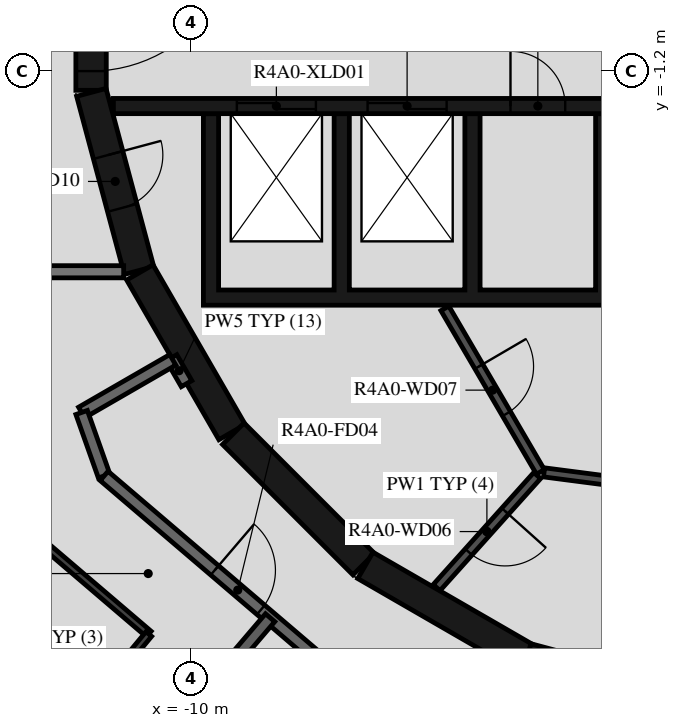
"""IFC4 building model, lengths in metres.
Left out: names, types, materials, properties, quantities, classifications, styles, units other than length and angle.
Written with IfcOpenShell. Run it as: python <this file> out.ifc"""

import sys

from ifc_helpers import new_model, si_unit, direction, frame, frame_2d, origin, place, context, subcontext, project, spatial, polyline, rectangle, outline, extrude, element, fill, save


model = new_model("IFC4")
c1 = context("Model", 3, precision=1e-05, world=origin(), true_north=direction((0.0, 1.0)))
c2 = subcontext(c1, "Body", "Model", "MODEL_VIEW")
j1 = project(units=[si_unit("LENGTHUNIT", "METRE"), si_unit("PLANEANGLEUNIT", "RADIAN")], contexts=[c1])
p1 = place(None, origin())
s1 = spatial("IfcSite", under=j1, at=p1, CompositionType="ELEMENT")
p2 = place(p1, origin())
s2 = spatial("IfcBuilding", under=s1, at=p2, CompositionType="ELEMENT")
p3 = place(p2, frame((0.0, 0.0, 151.7)))
s3 = spatial("IfcBuildingStorey", under=s2, at=p3, CompositionType="ELEMENT", Elevation=151.7)
p4 = place(p3, frame((-11.647, 1.516, 0.0), z_axis=(0.0, 0.0, 1.0), x_axis=(0.0, -1.0, 0.0)))
e1 = element("IfcWall", 1, at=p4, inside=s3, PredefinedType="SHEAR", context=c2, shape_type="SweptSolid", body=[
    extrude(rectangle(XDim=3.033, YDim=0.5, at=frame_2d((1.516, 0.0))), origin(), (0.0, 0.0, 1.0), 3.12),
])
p5 = place(p4, frame((0.316, 0.0, 0.0)))
e2 = element("IfcOpeningElement", 2, at=p5, cuts=e1, PredefinedType="OPENING", context=c2, shape_type="SweptSolid", body=[
    extrude(rectangle(XDim=2.4, YDim=2.1, at=frame_2d((1.2, 1.05))), frame((0.0, 0.26, 0.0), z_axis=(0.0, -1.0, 0.0), x_axis=(1.0, 0.0, 0.0)), (0.0, 0.0, 1.0), 0.52),
])
p6 = place(p3, frame((-11.643, -1.55, 0.0), z_axis=(0.0, 0.0, 1.0), x_axis=(0.258734743916, -0.965948410781, 0.0)))
e3 = element("IfcWall", 3, at=p6, inside=s3, PredefinedType="SHEAR", context=c2, shape_type="SweptSolid", body=[
    extrude(rectangle(XDim=3.033, YDim=0.5, at=frame_2d((1.516, 0.0))), origin(), (0.0, 0.0, 1.0), 3.12),
])
p7 = place(p6, frame((1.066, 0.0, 0.0)))
e4 = element("IfcOpeningElement", 4, at=p7, cuts=e3, PredefinedType="OPENING", context=c2, shape_type="SweptSolid", body=[
    extrude(rectangle(XDim=0.9, YDim=2.1, at=frame_2d((0.45, 1.05))), frame((0.0, 0.26, 0.0), z_axis=(0.0, -1.0, 0.0), x_axis=(1.0, 0.0, 0.0)), (0.0, 0.0, 1.0), 0.52),
])
p8 = place(p3, frame((-10.845, -4.51, 0.0), z_axis=(0.0, 0.0, 1.0), x_axis=(0.500087131594, -0.865975092491, 0.0)))
e5 = element("IfcWall", 5, at=p8, inside=s3, PredefinedType="SHEAR", context=c2, shape_type="SweptSolid", body=[
    extrude(rectangle(XDim=3.033, YDim=0.5, at=frame_2d((1.516, 0.0))), origin(), (0.0, 0.0, 1.0), 3.12),
])
p9 = place(p3, frame((-9.308, -7.164, 0.0), z_axis=(0.0, 0.0, 1.0), x_axis=(0.707106781187, -0.707106781187, 0.0)))
e6 = element("IfcWall", 6, at=p9, inside=s3, PredefinedType="SHEAR", context=c2, shape_type="SweptSolid", body=[
    extrude(rectangle(XDim=3.032, YDim=0.5, at=frame_2d((1.516, 0.0))), origin(), (0.0, 0.0, 1.0), 3.12),
])
for number, where, z_axis, x_axis in (
    (7, (-7.137, -9.329, 0.0), (0.0, 0.0, 1.0), (0.866, -0.5, 0.0)),
    (8, (-4.479, -10.858, 0.0), (0.0, 0.0, 1.0), (0.966, -0.259, 0.0)),
):
    element("IfcWall", number, at=place(p3, frame(where, z_axis=z_axis, x_axis=x_axis)), inside=s3, PredefinedType="SHEAR", context=c2, shape_type="SweptSolid", body=[
        extrude(rectangle(XDim=3.033, YDim=0.5, at=frame_2d((1.516, 0.0))), origin(), (0.0, 0.0, 1.0), 3.12),
    ])
p10 = place(p3, origin())
e9 = element("IfcWall", 9, at=p10, inside=s3, PredefinedType="SHEAR", context=c2, shape_type="SweptSolid", body=[
    extrude(outline(polyline([(9.8, -5.05), (9.8, -4.8), (9.8, -1.9), (9.55, -1.9), (9.55, -4.8), (7.65, -4.8), (7.65, -1.9), (7.4, -1.9), (7.4, -4.8), (5.5, -4.8), (5.5, -1.9), (5.25, -1.9), (5.25, -4.8), (3.35, -4.8), (3.35, -1.9), (3.1, -1.9), (3.1, -4.8), (1.2, -4.8), (1.2, -1.9), (0.95, -1.9), (0.95, -4.8), (-0.95, -4.8), (-0.95, -1.9), (-1.2, -1.9), (-1.2, -4.8), (-3.1, -4.8), (-3.1, -1.9), (-3.35, -1.9), (-3.35, -4.8), (-5.25, -4.8), (-5.25, -1.9), (-5.5, -1.9), (-5.5, -4.8), (-7.4, -4.8), (-7.4, -1.9), (-7.65, -1.9), (-7.65, -4.8), (-9.55, -4.8), (-9.55, -1.9), (-9.8, -1.9), (-9.8, -4.8), (-9.8, -5.05), (9.8, -5.05)])), origin(), (0.0, 0.0, 1.0), 3.12),
])
p11 = place(p3, frame((-11.28, -1.775, 0.0), z_axis=(0.0, 0.0, 1.0), x_axis=(1.0, 0.0, 0.0)))
e10 = element("IfcWall", 10, at=p11, inside=s3, PredefinedType="SHEAR", context=c2, shape_type="SweptSolid", body=[
    extrude(rectangle(XDim=14.38, YDim=0.25, at=frame_2d((7.19, 0.0))), origin(), (0.0, 0.0, 1.0), 3.12),
])
p12 = place(p11, frame((2.03, 0.0, 0.0)))
e11 = element("IfcOpeningElement", 11, at=p12, cuts=e10, PredefinedType="OPENING", context=c2, shape_type="SweptSolid", body=[
    extrude(rectangle(XDim=1.3, YDim=2.1, at=frame_2d((0.65, 1.05))), frame((0.0, 0.135, 0.0), z_axis=(0.0, -1.0, 0.0), x_axis=(1.0, 0.0, 0.0)), (0.0, 0.0, 1.0), 0.27),
])
p13 = place(p11, frame((4.18, 0.0, 0.0)))
e12 = element("IfcOpeningElement", 12, at=p13, cuts=e10, PredefinedType="OPENING", context=c2, shape_type="SweptSolid", body=[
    extrude(rectangle(XDim=1.3, YDim=2.1, at=frame_2d((0.65, 1.05))), frame((0.0, 0.135, 0.0), z_axis=(0.0, -1.0, 0.0), x_axis=(1.0, 0.0, 0.0)), (0.0, 0.0, 1.0), 0.27),
])
p14 = place(p11, frame((12.88, 0.0, 0.0)))
e13 = element("IfcOpeningElement", 13, at=p14, cuts=e10, PredefinedType="OPENING", context=c2, shape_type="SweptSolid", body=[
    extrude(rectangle(XDim=1.1, YDim=2.1, at=frame_2d((0.55, 1.05))), frame((0.0, 0.135, 0.0), z_axis=(0.0, -1.0, 0.0), x_axis=(1.0, 0.0, 0.0)), (0.0, 0.0, 1.0), 0.27),
])
p15 = place(p11, frame((6.53, 0.0, 0.0)))
e14 = element("IfcOpeningElement", 14, at=p15, cuts=e10, PredefinedType="OPENING", context=c2, shape_type="SweptSolid", body=[
    extrude(rectangle(XDim=0.9, YDim=2.1, at=frame_2d((0.45, 1.05))), frame((0.0, 0.135, 0.0), z_axis=(0.0, -1.0, 0.0), x_axis=(1.0, 0.0, 0.0)), (0.0, 0.0, 1.0), 0.27),
])
p16 = place(p11, frame((8.68, 0.0, 0.0)))
e15 = element("IfcOpeningElement", 15, at=p16, cuts=e10, PredefinedType="OPENING", context=c2, shape_type="SweptSolid", body=[
    extrude(rectangle(XDim=0.9, YDim=2.1, at=frame_2d((0.45, 1.05))), frame((0.0, 0.135, 0.0), z_axis=(0.0, -1.0, 0.0), x_axis=(1.0, 0.0, 0.0)), (0.0, 0.0, 1.0), 0.27),
])
p17 = place(p11, frame((10.83, 0.0, 0.0)))
e16 = element("IfcOpeningElement", 16, at=p17, cuts=e10, PredefinedType="OPENING", context=c2, shape_type="SweptSolid", body=[
    extrude(rectangle(XDim=0.9, YDim=2.1, at=frame_2d((0.45, 1.05))), frame((0.0, 0.135, 0.0), z_axis=(0.0, -1.0, 0.0), x_axis=(1.0, 0.0, 0.0)), (0.0, 0.0, 1.0), 0.27),
])
p18 = place(p3, frame((-5.829, -5.102, 0.0), z_axis=(0.0, 0.0, 1.0), x_axis=(0.504480008384, -0.863423373057, 0.0)))
e17 = element("IfcWall", 17, at=p18, inside=s3, PredefinedType="PARTITIONING", context=c2, shape_type="SweptSolid", body=[
    extrude(rectangle(XDim=3.115, YDim=0.15, at=frame_2d((1.558, 0.0))), origin(), (0.0, 0.0, 1.0), 3.12),
])
p19 = place(p18, frame((1.107, 0.0, 0.0)))
e18 = element("IfcOpeningElement", 18, at=p19, cuts=e17, PredefinedType="OPENING", context=c2, shape_type="SweptSolid", body=[
    extrude(rectangle(XDim=0.9, YDim=2.1, at=frame_2d((0.45, 1.05))), frame((0.0, 0.085, 0.0), z_axis=(0.0, -1.0, 0.0), x_axis=(1.0, 0.0, 0.0)), (0.0, 0.0, 1.0), 0.17),
])
p20 = place(p3, frame((-4.311, -7.851, 0.0), z_axis=(0.0, 0.0, 1.0), x_axis=(-0.667869133096, -0.744278725383, 0.0)))
e19 = element("IfcWall", 19, at=p20, inside=s3, PredefinedType="PARTITIONING", context=c2, shape_type="SweptSolid", body=[
    extrude(rectangle(XDim=2.476, YDim=0.15, at=frame_2d((1.238, 0.0))), origin(), (0.0, 0.0, 1.0), 3.12),
])
p21 = place(p20, frame((0.788, 0.0, 0.0)))
e20 = element("IfcOpeningElement", 20, at=p21, cuts=e19, PredefinedType="OPENING", context=c2, shape_type="SweptSolid", body=[
    extrude(rectangle(XDim=0.9, YDim=2.1, at=frame_2d((0.45, 1.05))), frame((0.0, 0.085, 0.0), z_axis=(0.0, -1.0, 0.0), x_axis=(1.0, 0.0, 0.0)), (0.0, 0.0, 1.0), 0.17),
])
p22 = place(p3, frame((-4.198, -7.799, 0.0), z_axis=(0.0, 0.0, 1.0), x_axis=(0.991686747293, -0.128675542523, 0.0)))
e21 = element("IfcWall", 21, at=p22, inside=s3, PredefinedType="PARTITIONING", context=c2, shape_type="SweptSolid", body=[
    extrude(rectangle(XDim=1.793, YDim=0.15, at=frame_2d((0.896, 0.0))), origin(), (0.0, 0.0, 1.0), 3.12),
])
p23 = place(p3, frame((-10.323, -5.914, 0.0), z_axis=(0.0, 0.0, 1.0), x_axis=(0.500137201729, -0.865946175837, 0.0)))
e22 = element("IfcWall", 22, at=p23, inside=s3, PredefinedType="STANDARD", context=c2, shape_type="SweptSolid", body=[
    extrude(rectangle(XDim=0.492, YDim=0.2, at=frame_2d((0.246, 0.0))), origin(), (0.0, 0.0, 1.0), 3.12),
])
p24 = place(p3, frame((-10.303, -5.949, 0.0), z_axis=(0.0, 0.0, 1.0), x_axis=(-0.866021168401, -0.500007335828, 0.0)))
e23 = element("IfcWall", 23, at=p24, inside=s3, PredefinedType="STANDARD", context=c2, shape_type="SweptSolid", body=[
    extrude(rectangle(XDim=1.731, YDim=0.2, at=frame_2d((0.865, 0.0))), origin(), (0.0, 0.0, 1.0), 3.12),
])
p25 = place(p3, frame((-11.802, -6.814, 0.0), z_axis=(0.0, 0.0, 1.0), x_axis=(0.333904297771, -0.942606980629, 0.0)))
e24 = element("IfcWall", 24, at=p25, inside=s3, PredefinedType="STANDARD", context=c2, shape_type="SweptSolid", body=[
    extrude(rectangle(XDim=1.107, YDim=0.2, at=frame_2d((0.553, 0.0))), origin(), (0.0, 0.0, 1.0), 3.12),
])
p26 = place(p3, frame((-11.433, -7.858, 0.0), z_axis=(0.0, 0.0, 1.0), x_axis=(0.760412154545, -0.649440801937, 0.0)))
e25 = element("IfcWall", 25, at=p26, inside=s3, PredefinedType="STANDARD", context=c2, shape_type="SweptSolid", body=[
    extrude(rectangle(XDim=7.181, YDim=0.2, at=frame_2d((3.59, 0.0))), origin(), (0.0, 0.0, 1.0), 3.12),
])
p27 = place(p26, frame((2.39, 0.0, 0.0)))
e26 = element("IfcOpeningElement", 26, at=p27, cuts=e25, PredefinedType="OPENING", context=c2, shape_type="SweptSolid", body=[
    extrude(rectangle(XDim=1.0, YDim=2.1, at=frame_2d((0.5, 1.05))), frame((0.0, 0.11, 0.0), z_axis=(0.0, -1.0, 0.0), x_axis=(1.0, 0.0, 0.0)), (0.0, 0.0, 1.0), 0.22),
])
p28 = place(p3, frame((-17.9, -4.5, 0.0), z_axis=(0.0, 0.0, 1.0), x_axis=(1.0, 0.0, 0.0)))
e27 = element("IfcWall", 27, at=p28, inside=s3, PredefinedType="STANDARD", context=c2, shape_type="SweptSolid", body=[
    extrude(rectangle(XDim=6.789, YDim=0.2, at=frame_2d((3.394, 0.0))), origin(), (0.0, 0.0, 1.0), 3.12),
])
p29 = place(p3, frame((-11.838, -13.86, 0.0), z_axis=(0.0, 0.0, 1.0), x_axis=(0.64944503311, 0.760408540831, 0.0)))
e28 = element("IfcWall", 28, at=p29, inside=s3, PredefinedType="STANDARD", context=c2, shape_type="SweptSolid", body=[
    extrude(rectangle(XDim=4.827, YDim=0.2, at=frame_2d((2.414, 0.0))), origin(), (0.0, 0.0, 1.0), 3.12),
])
p30 = place(p3, frame((-12.713, -8.737, 0.0), z_axis=(0.0, 0.0, 1.0), x_axis=(0.760400223405, -0.649454771517, 0.0)))
e29 = element("IfcWall", 29, at=p30, inside=s3, PredefinedType="PARTITIONING", context=c2, shape_type="SweptSolid", body=[
    extrude(rectangle(XDim=2.649, YDim=0.12, at=frame_2d((1.325, 0.0))), origin(), (0.0, 0.0, 1.0), 3.12),
])
p31 = place(p3, frame((-10.698, -10.458, 0.0), z_axis=(0.0, 0.0, 1.0), x_axis=(-0.63830561059, -0.769783052223, 0.0)))
e30 = element("IfcWall", 30, at=p31, inside=s3, PredefinedType="PARTITIONING", context=c2, shape_type="SweptSolid", body=[
    extrude(rectangle(XDim=5.131, YDim=0.12, at=frame_2d((2.565, 0.0))), origin(), (0.0, 0.0, 1.0), 3.12),
])
p32 = place(p31, frame((2.363, 0.0, 0.0)))
e31 = element("IfcOpeningElement", 31, at=p32, cuts=e30, PredefinedType="OPENING", context=c2, shape_type="SweptSolid", body=[
    extrude(rectangle(XDim=0.8, YDim=2.1, at=frame_2d((0.4, 1.05))), frame((0.0, 0.07, 0.0), z_axis=(0.0, -1.0, 0.0), x_axis=(1.0, 0.0, 0.0)), (0.0, 0.0, 1.0), 0.14),
])
p33 = place(p5, origin())
e32 = element("IfcDoor", 32, at=p33, inside=s3, OperationType="DOUBLE_DOOR_SINGLE_SWING", PredefinedType="DOOR", context=c2, shape_type="SweptSolid", body=[
    extrude(rectangle(XDim=2.4, YDim=2.1, at=frame_2d((1.2, 1.05))), frame((0.0, 0.025, 0.0), z_axis=(0.0, -1.0, 0.0), x_axis=(1.0, 0.0, 0.0)), (0.0, 0.0, 1.0), 0.05),
])
fill(e2, e32)
p34 = place(p12, origin())
e33 = element("IfcDoor", 33, at=p34, inside=s3, OperationType="DOUBLE_DOOR_SLIDING", PredefinedType="DOOR", context=c2, shape_type="SweptSolid", body=[
    extrude(rectangle(XDim=1.3, YDim=2.1, at=frame_2d((0.65, 1.05))), frame((0.0, 0.025, 0.0), z_axis=(0.0, -1.0, 0.0), x_axis=(1.0, 0.0, 0.0)), (0.0, 0.0, 1.0), 0.05),
])
fill(e11, e33)
p35 = place(p13, origin())
e34 = element("IfcDoor", 34, at=p35, inside=s3, OperationType="DOUBLE_DOOR_SLIDING", PredefinedType="DOOR", context=c2, shape_type="SweptSolid", body=[
    extrude(rectangle(XDim=1.3, YDim=2.1, at=frame_2d((0.65, 1.05))), frame((0.0, 0.025, 0.0), z_axis=(0.0, -1.0, 0.0), x_axis=(1.0, 0.0, 0.0)), (0.0, 0.0, 1.0), 0.05),
])
fill(e12, e34)
p36 = place(p15, origin())
e35 = element("IfcDoor", 35, at=p36, inside=s3, OperationType="SINGLE_SWING_LEFT", PredefinedType="DOOR", context=c2, shape_type="SweptSolid", body=[
    extrude(rectangle(XDim=0.9, YDim=2.1, at=frame_2d((0.45, 1.05))), frame((0.0, 0.025, 0.0), z_axis=(0.0, -1.0, 0.0), x_axis=(1.0, 0.0, 0.0)), (0.0, 0.0, 1.0), 0.05),
])
fill(e14, e35)
p37 = place(p21, origin())
e36 = element("IfcDoor", 36, at=p37, inside=s3, OperationType="SINGLE_SWING_RIGHT", PredefinedType="DOOR", context=c2, shape_type="SweptSolid", body=[
    extrude(rectangle(XDim=0.9, YDim=2.1, at=frame_2d((0.45, 1.05))), frame((0.0, 0.025, 0.0), z_axis=(0.0, -1.0, 0.0), x_axis=(1.0, 0.0, 0.0)), (0.0, 0.0, 1.0), 0.05),
])
fill(e20, e36)
p38 = place(p19, origin())
e37 = element("IfcDoor", 37, at=p38, inside=s3, OperationType="SINGLE_SWING_LEFT", PredefinedType="DOOR", context=c2, shape_type="SweptSolid", body=[
    extrude(rectangle(XDim=0.9, YDim=2.1, at=frame_2d((0.45, 1.05))), frame((0.0, 0.025, 0.0), z_axis=(0.0, -1.0, 0.0), x_axis=(1.0, 0.0, 0.0)), (0.0, 0.0, 1.0), 0.05),
])
fill(e18, e37)
p39 = place(p7, origin())
e38 = element("IfcDoor", 38, at=p39, inside=s3, OperationType="SINGLE_SWING_RIGHT", PredefinedType="DOOR", context=c2, shape_type="SweptSolid", body=[
    extrude(rectangle(XDim=0.9, YDim=2.1, at=frame_2d((0.45, 1.05))), frame((0.0, 0.025, 0.0), z_axis=(0.0, -1.0, 0.0), x_axis=(1.0, 0.0, 0.0)), (0.0, 0.0, 1.0), 0.05),
])
fill(e4, e38)
p40 = place(p27, origin())
e39 = element("IfcDoor", 39, at=p40, inside=s3, OperationType="SINGLE_SWING_RIGHT", PredefinedType="DOOR", context=c2, shape_type="SweptSolid", body=[
    extrude(rectangle(XDim=1.0, YDim=2.1, at=frame_2d((0.5, 1.05))), frame((0.0, 0.025, 0.0), z_axis=(0.0, -1.0, 0.0), x_axis=(1.0, 0.0, 0.0)), (0.0, 0.0, 1.0), 0.05),
])
fill(e26, e39)
save(model, sys.argv[1])
